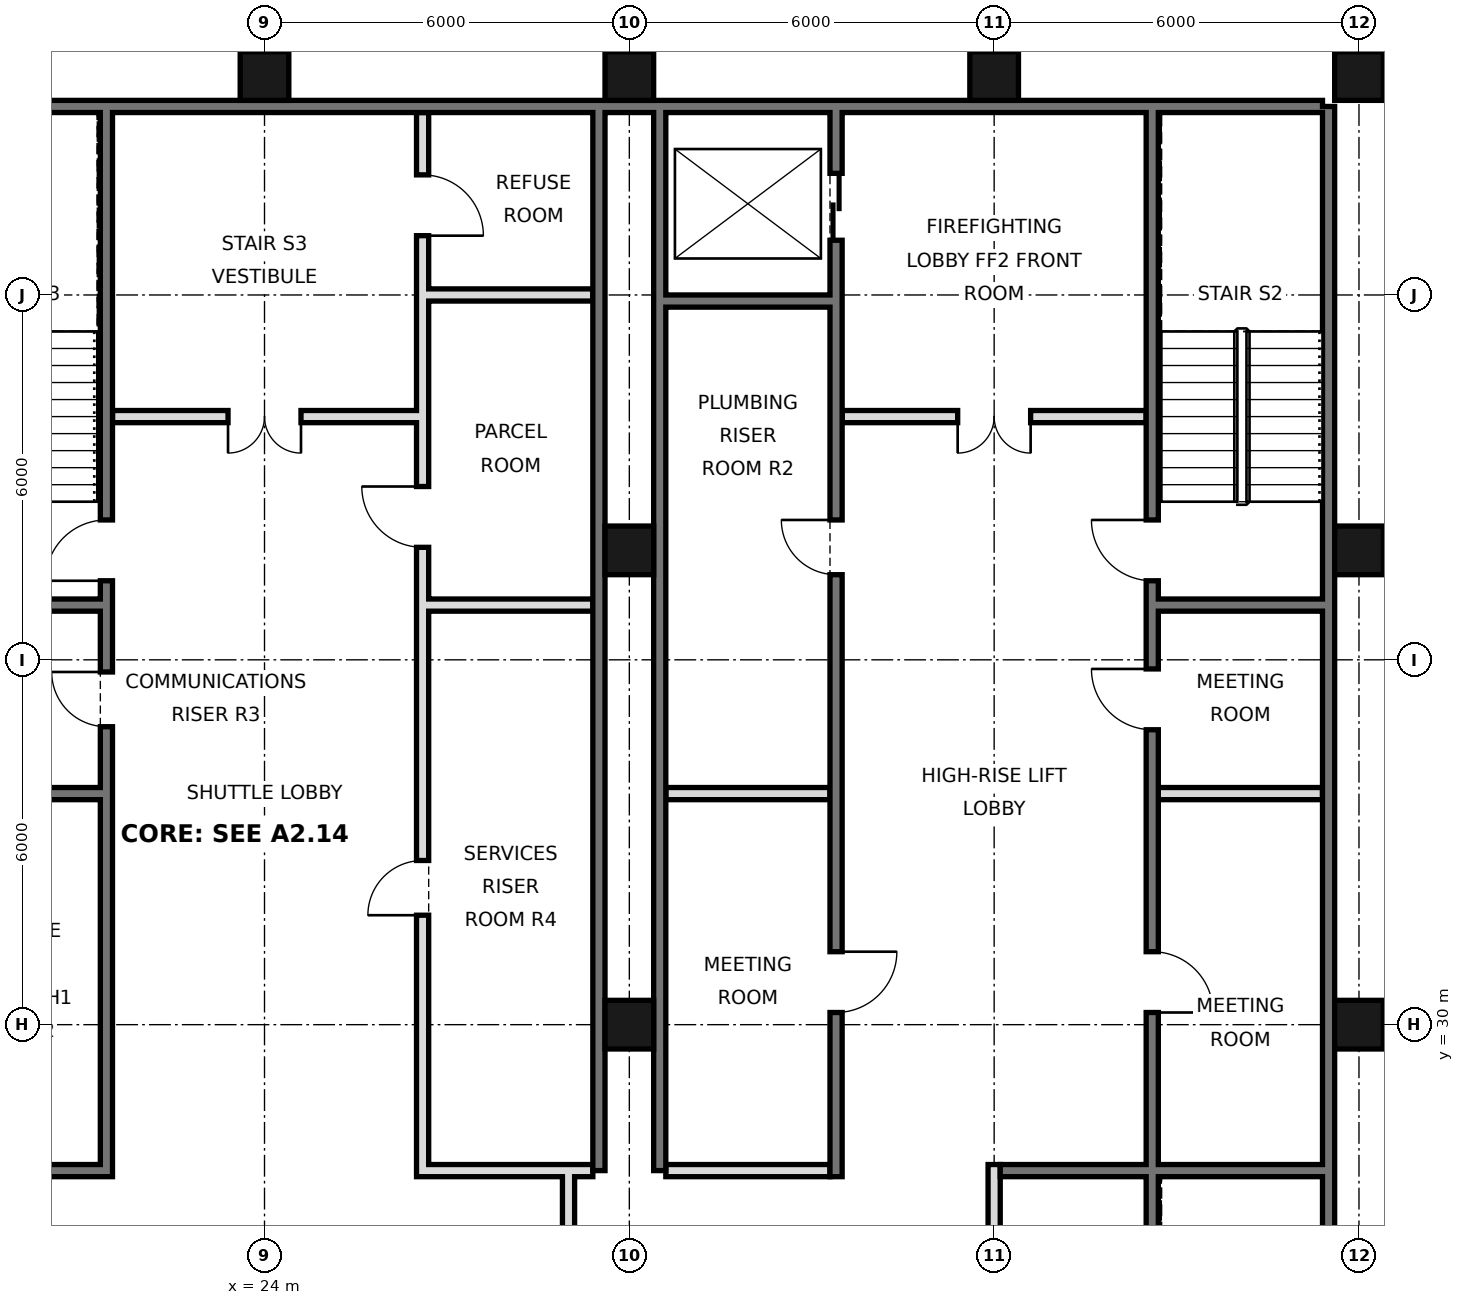
"""IFC4 building model, lengths in metres.
Left out: names, types, materials, properties, quantities, classifications, styles, units other than length and angle.
Written with IfcOpenShell. Run it as: python <this file> out.ifc"""

import sys

from ifc_helpers import new_model, si_unit, direction, frame, frame_2d, origin, origin_2d, place, context, subcontext, project, spatial, rectangle, hollow_rectangle, extrude, element, fill, save


model = new_model("IFC4")
c1 = context("Model", 3, precision=1e-05, world=origin(), true_north=direction((0.0, 1.0)))
c2 = subcontext(c1, "Body", "Model", "MODEL_VIEW")
j1 = project(units=[si_unit("LENGTHUNIT", "METRE"), si_unit("PLANEANGLEUNIT", "RADIAN")], contexts=[c1])
p1 = place(None, origin())
s1 = spatial("IfcSite", under=j1, at=p1, CompositionType="ELEMENT")
p2 = place(p1, origin())
s2 = spatial("IfcBuilding", under=s1, at=p2, CompositionType="ELEMENT")
p3 = place(p2, frame((0.0, 0.0, 57.0)))
s3 = spatial("IfcBuildingStorey", under=s2, at=p3, CompositionType="ELEMENT", Elevation=57.0)
for number, where, z_axis, x_axis in (
    (1, (24.0, 45.6, 0.0), (0.0, 0.0, 1.0), (1.0, 0.0, 0.0)),
    (2, (30.0, 30.0, 0.0), (0.0, 0.0, 1.0), (1.0, 0.0, 0.0)),
    (3, (30.0, 37.8, 0.0), (0.0, 0.0, 1.0), (1.0, 0.0, 0.0)),
    (4, (30.0, 45.6, 0.0), (0.0, 0.0, 1.0), (1.0, 0.0, 0.0)),
    (5, (36.0, 45.6, 0.0), (0.0, 0.0, 1.0), (1.0, 0.0, 0.0)),
    (6, (42.0, 30.0, 0.0), (0.0, 0.0, 1.0), (1.0, 0.0, 0.0)),
    (7, (42.0, 37.8, 0.0), (0.0, 0.0, 1.0), (1.0, 0.0, 0.0)),
    (8, (42.0, 45.6, 0.0), (0.0, 0.0, 1.0), (1.0, 0.0, 0.0)),
):
    element("IfcColumn", number, at=place(p3, frame(where, z_axis=z_axis, x_axis=x_axis)), inside=s3, PredefinedType="COLUMN", context=c2, shape_type="SweptSolid", body=[
        extrude(hollow_rectangle(XDim=0.8, YDim=0.8, WallThickness=0.06, at=origin_2d()), origin(), (0.0, 0.0, 1.0), 3.6),
    ])
p4 = place(p3, frame((41.5, 21.6, 0.0), z_axis=(0.0, 0.0, 1.0), x_axis=(0.0, 1.0, 0.0)))
e9 = element("IfcWall", 9, at=p4, inside=s3, PredefinedType="SOLIDWALL", context=c2, shape_type="SweptSolid", body=[
    extrude(rectangle(XDim=23.5, YDim=0.2, at=frame_2d((11.75, 0.0))), origin(), (0.0, 0.0, 1.0), 3.42),
])
p5 = place(p3, frame((6.6, 45.1, 0.0), z_axis=(0.0, 0.0, 1.0), x_axis=(1.0, 0.0, 0.0)))
e10 = element("IfcWall", 10, at=p5, inside=s3, PredefinedType="SOLIDWALL", context=c2, shape_type="SweptSolid", body=[
    extrude(rectangle(XDim=34.8, YDim=0.2, at=frame_2d((17.4, 0.0))), origin(), (0.0, 0.0, 1.0), 3.42),
])
for number, where, z_axis, x_axis in (
    (11, (29.5, 27.6, 0.0), (0.0, 0.0, 1.0), (0.0, 1.0, 0.0)),
    (12, (30.5, 27.6, 0.0), (0.0, 0.0, 1.0), (0.0, 1.0, 0.0)),
):
    element("IfcWall", number, at=place(p3, frame(where, z_axis=z_axis, x_axis=x_axis)), inside=s3, PredefinedType="SOLIDWALL", context=c2, shape_type="SweptSolid", body=[
        extrude(rectangle(XDim=17.5, YDim=0.2, at=frame_2d((8.75, 0.0))), origin(), (0.0, 0.0, 1.0), 3.42),
    ])
p6 = place(p3, frame((29.0, 21.6, 0.0), z_axis=(0.0, 0.0, 1.0), x_axis=(0.0, 1.0, 0.0)))
e13 = element("IfcWall", 13, at=p6, inside=s3, PredefinedType="PARTITIONING", context=c2, shape_type="SweptSolid", body=[
    extrude(rectangle(XDim=6.0, YDim=0.2, at=frame_2d((3.0, 0.0))), origin(), (0.0, 0.0, 1.0), 3.42),
])
p7 = place(p6, frame((2.1, 0.0, 0.0)))
e14 = element("IfcOpeningElement", 14, at=p7, cuts=e13, PredefinedType="OPENING", context=c2, shape_type="SweptSolid", body=[
    extrude(rectangle(XDim=1.8, YDim=2.1, at=frame_2d((0.9, 1.05))), frame((0.0, 0.11, 0.0), z_axis=(0.0, -1.0, 0.0), x_axis=(1.0, 0.0, 0.0)), (0.0, 0.0, 1.0), 0.22),
])
p8 = place(p3, frame((21.4, 27.5, 0.0), z_axis=(0.0, 0.0, 1.0), x_axis=(0.0, 1.0, 0.0)))
e15 = element("IfcWall", 15, at=p8, inside=s3, PredefinedType="SOLIDWALL", context=c2, shape_type="SweptSolid", body=[
    extrude(rectangle(XDim=17.5, YDim=0.2, at=frame_2d((8.75, 0.0))), origin(), (0.0, 0.0, 1.0), 3.42),
])
p9 = place(p8, frame((9.8, 0.0, 0.0)))
e16 = element("IfcOpeningElement", 16, at=p9, cuts=e15, PredefinedType="OPENING", context=c2, shape_type="SweptSolid", body=[
    extrude(rectangle(XDim=1.0, YDim=2.1, at=frame_2d((0.5, 1.05))), frame((0.0, 0.11, 0.0), z_axis=(0.0, -1.0, 0.0), x_axis=(1.0, 0.0, 0.0)), (0.0, 0.0, 1.0), 0.22),
])
p10 = place(p8, frame((7.4, 0.0, 0.0)))
e17 = element("IfcOpeningElement", 17, at=p10, cuts=e15, PredefinedType="OPENING", context=c2, shape_type="SweptSolid", body=[
    extrude(rectangle(XDim=0.9, YDim=2.1, at=frame_2d((0.45, 1.05))), frame((0.0, 0.11, 0.0), z_axis=(0.0, -1.0, 0.0), x_axis=(1.0, 0.0, 0.0)), (0.0, 0.0, 1.0), 0.22),
])
p11 = place(p3, frame((26.6, 27.5, 0.0), z_axis=(0.0, 0.0, 1.0), x_axis=(0.0, 1.0, 0.0)))
e18 = element("IfcWall", 18, at=p11, inside=s3, PredefinedType="SOLIDWALL", context=c2, shape_type="SweptSolid", body=[
    extrude(rectangle(XDim=17.5, YDim=0.2, at=frame_2d((8.75, 0.0))), origin(), (0.0, 0.0, 1.0), 3.42),
])
p12 = place(p11, frame((4.3, 0.0, 0.0)))
e19 = element("IfcOpeningElement", 19, at=p12, cuts=e18, PredefinedType="OPENING", context=c2, shape_type="SweptSolid", body=[
    extrude(rectangle(XDim=0.9, YDim=2.1, at=frame_2d((0.45, 1.05))), frame((0.0, 0.11, 0.0), z_axis=(0.0, -1.0, 0.0), x_axis=(1.0, 0.0, 0.0)), (0.0, 0.0, 1.0), 0.22),
])
p13 = place(p11, frame((10.35, 0.0, 0.0)))
e20 = element("IfcOpeningElement", 20, at=p13, cuts=e18, PredefinedType="OPENING", context=c2, shape_type="SweptSolid", body=[
    extrude(rectangle(XDim=1.0, YDim=2.1, at=frame_2d((0.5, 1.05))), frame((0.0, 0.11, 0.0), z_axis=(0.0, -1.0, 0.0), x_axis=(1.0, 0.0, 0.0)), (0.0, 0.0, 1.0), 0.22),
])
p14 = place(p11, frame((15.475, 0.0, 0.0)))
e21 = element("IfcOpeningElement", 21, at=p14, cuts=e18, PredefinedType="OPENING", context=c2, shape_type="SweptSolid", body=[
    extrude(rectangle(XDim=1.0, YDim=2.1, at=frame_2d((0.5, 1.05))), frame((0.0, 0.11, 0.0), z_axis=(0.0, -1.0, 0.0), x_axis=(1.0, 0.0, 0.0)), (0.0, 0.0, 1.0), 0.22),
])
p15 = place(p3, frame((33.4, 27.5, 0.0), z_axis=(0.0, 0.0, 1.0), x_axis=(0.0, 1.0, 0.0)))
e22 = element("IfcWall", 22, at=p15, inside=s3, PredefinedType="SOLIDWALL", context=c2, shape_type="SweptSolid", body=[
    extrude(rectangle(XDim=17.5, YDim=0.2, at=frame_2d((8.75, 0.0))), origin(), (0.0, 0.0, 1.0), 3.42),
])
p16 = place(p15, frame((15.4, 0.0, 0.0)))
e23 = element("IfcOpeningElement", 23, at=p16, cuts=e22, PredefinedType="OPENING", context=c2, shape_type="SweptSolid", body=[
    extrude(rectangle(XDim=1.1, YDim=2.1, at=frame_2d((0.55, 1.05))), frame((0.0, 0.11, 0.0), z_axis=(0.0, -1.0, 0.0), x_axis=(1.0, 0.0, 0.0)), (0.0, 0.0, 1.0), 0.22),
])
p17 = place(p15, frame((2.7, 0.0, 0.0)))
e24 = element("IfcOpeningElement", 24, at=p17, cuts=e22, PredefinedType="OPENING", context=c2, shape_type="SweptSolid", body=[
    extrude(rectangle(XDim=1.0, YDim=2.1, at=frame_2d((0.5, 1.05))), frame((0.0, 0.11, 0.0), z_axis=(0.0, -1.0, 0.0), x_axis=(1.0, 0.0, 0.0)), (0.0, 0.0, 1.0), 0.22),
])
p18 = place(p15, frame((9.9, 0.0, 0.0)))
e25 = element("IfcOpeningElement", 25, at=p18, cuts=e22, PredefinedType="OPENING", context=c2, shape_type="SweptSolid", body=[
    extrude(rectangle(XDim=0.9, YDim=2.1, at=frame_2d((0.45, 1.05))), frame((0.0, 0.11, 0.0), z_axis=(0.0, -1.0, 0.0), x_axis=(1.0, 0.0, 0.0)), (0.0, 0.0, 1.0), 0.22),
])
p19 = place(p3, frame((36.0, 21.6, 0.0), z_axis=(0.0, 0.0, 1.0), x_axis=(0.0, 1.0, 0.0)))
e26 = element("IfcWall", 26, at=p19, inside=s3, PredefinedType="PARTITIONING", context=c2, shape_type="SweptSolid", body=[
    extrude(rectangle(XDim=6.1, YDim=0.2, at=frame_2d((3.05, 0.0))), origin(), (0.0, 0.0, 1.0), 3.42),
])
p20 = place(p3, frame((38.6, 21.6, 0.0), z_axis=(0.0, 0.0, 1.0), x_axis=(0.0, 1.0, 0.0)))
e27 = element("IfcWall", 27, at=p20, inside=s3, PredefinedType="SOLIDWALL", context=c2, shape_type="SweptSolid", body=[
    extrude(rectangle(XDim=23.4, YDim=0.2, at=frame_2d((11.7, 0.0))), origin(), (0.0, 0.0, 1.0), 3.42),
])
p21 = place(p20, frame((8.6, 0.0, 0.0)))
e28 = element("IfcOpeningElement", 28, at=p21, cuts=e27, PredefinedType="OPENING", context=c2, shape_type="SweptSolid", body=[
    extrude(rectangle(XDim=1.0, YDim=2.1, at=frame_2d((0.5, 1.05))), frame((0.0, 0.11, 0.0), z_axis=(0.0, -1.0, 0.0), x_axis=(1.0, 0.0, 0.0)), (0.0, 0.0, 1.0), 0.22),
])
p22 = place(p20, frame((13.25, 0.0, 0.0)))
e29 = element("IfcOpeningElement", 29, at=p22, cuts=e27, PredefinedType="OPENING", context=c2, shape_type="SweptSolid", body=[
    extrude(rectangle(XDim=1.0, YDim=2.1, at=frame_2d((0.5, 1.05))), frame((0.0, 0.11, 0.0), z_axis=(0.0, -1.0, 0.0), x_axis=(1.0, 0.0, 0.0)), (0.0, 0.0, 1.0), 0.22),
])
p23 = place(p20, frame((15.7, 0.0, 0.0)))
e30 = element("IfcOpeningElement", 30, at=p23, cuts=e27, PredefinedType="OPENING", context=c2, shape_type="SweptSolid", body=[
    extrude(rectangle(XDim=1.0, YDim=2.1, at=frame_2d((0.5, 1.05))), frame((0.0, 0.11, 0.0), z_axis=(0.0, -1.0, 0.0), x_axis=(1.0, 0.0, 0.0)), (0.0, 0.0, 1.0), 0.22),
])
p24 = place(p20, frame((0.175, 0.0, 0.0)))
e31 = element("IfcOpeningElement", 31, at=p24, cuts=e27, PredefinedType="OPENING", context=c2, shape_type="SweptSolid", body=[
    extrude(rectangle(XDim=0.9, YDim=2.1, at=frame_2d((0.45, 1.05))), frame((0.0, 0.11, 0.0), z_axis=(0.0, -1.0, 0.0), x_axis=(1.0, 0.0, 0.0)), (0.0, 0.0, 1.0), 0.22),
])
for number, where, z_axis, x_axis in (
    (32, (18.6, 27.6, 0.0), (0.0, 0.0, 1.0), (1.0, 0.0, 0.0)),
    (33, (26.7, 27.6, 0.0), (0.0, 0.0, 1.0), (1.0, 0.0, 0.0)),
):
    element("IfcWall", number, at=place(p3, frame(where, z_axis=z_axis, x_axis=x_axis)), inside=s3, PredefinedType="SOLIDWALL", context=c2, shape_type="SweptSolid", body=[
        extrude(rectangle(XDim=2.7, YDim=0.2, at=frame_2d((1.35, 0.0))), origin(), (0.0, 0.0, 1.0), 3.42),
    ])
p25 = place(p3, frame((30.6, 27.6, 0.0), z_axis=(0.0, 0.0, 1.0), x_axis=(1.0, 0.0, 0.0)))
e34 = element("IfcWall", 34, at=p25, inside=s3, PredefinedType="PARTITIONING", context=c2, shape_type="SweptSolid", body=[
    extrude(rectangle(XDim=2.7, YDim=0.2, at=frame_2d((1.35, 0.0))), origin(), (0.0, 0.0, 1.0), 3.42),
])
p26 = place(p3, frame((36.1, 27.6, 0.0), z_axis=(0.0, 0.0, 1.0), x_axis=(1.0, 0.0, 0.0)))
e35 = element("IfcWall", 35, at=p26, inside=s3, PredefinedType="SOLIDWALL", context=c2, shape_type="SweptSolid", body=[
    extrude(rectangle(XDim=5.3, YDim=0.2, at=frame_2d((2.65, 0.0))), origin(), (0.0, 0.0, 1.0), 3.42),
])
for number, where, z_axis, x_axis in (
    (36, (18.6, 33.8, 0.0), (0.0, 0.0, 1.0), (1.0, 0.0, 0.0)),
    (37, (30.6, 33.8, 0.0), (0.0, 0.0, 1.0), (1.0, 0.0, 0.0)),
):
    element("IfcWall", number, at=place(p3, frame(where, z_axis=z_axis, x_axis=x_axis)), inside=s3, PredefinedType="SOLIDWALL", context=c2, shape_type="SweptSolid", body=[
        extrude(rectangle(XDim=2.7, YDim=0.2, at=frame_2d((1.35, 0.0))), origin(), (0.0, 0.0, 1.0), 3.42),
    ])
p27 = place(p3, frame((38.7, 33.8, 0.0), z_axis=(0.0, 0.0, 1.0), x_axis=(1.0, 0.0, 0.0)))
e38 = element("IfcWall", 38, at=p27, inside=s3, PredefinedType="PARTITIONING", context=c2, shape_type="SweptSolid", body=[
    extrude(rectangle(XDim=2.7, YDim=0.2, at=frame_2d((1.35, 0.0))), origin(), (0.0, 0.0, 1.0), 3.42),
])
for number, where, z_axis, x_axis in (
    (39, (18.6, 36.9, 0.0), (0.0, 0.0, 1.0), (1.0, 0.0, 0.0)),
    (40, (26.7, 36.9, 0.0), (0.0, 0.0, 1.0), (1.0, 0.0, 0.0)),
    (41, (38.7, 36.9, 0.0), (0.0, 0.0, 1.0), (1.0, 0.0, 0.0)),
):
    element("IfcWall", number, at=place(p3, frame(where, z_axis=z_axis, x_axis=x_axis)), inside=s3, PredefinedType="SOLIDWALL", context=c2, shape_type="SweptSolid", body=[
        extrude(rectangle(XDim=2.7, YDim=0.2, at=frame_2d((1.35, 0.0))), origin(), (0.0, 0.0, 1.0), 3.42),
    ])
p28 = place(p3, frame((21.5, 40.0, 0.0), z_axis=(0.0, 0.0, 1.0), x_axis=(1.0, 0.0, 0.0)))
e42 = element("IfcWall", 42, at=p28, inside=s3, PredefinedType="PARTITIONING", context=c2, shape_type="SweptSolid", body=[
    extrude(rectangle(XDim=5.0, YDim=0.2, at=frame_2d((2.5, 0.0))), origin(), (0.0, 0.0, 1.0), 3.42),
])
p29 = place(p28, frame((1.9, 0.0, 0.0)))
e43 = element("IfcOpeningElement", 43, at=p29, cuts=e42, PredefinedType="OPENING", context=c2, shape_type="SweptSolid", body=[
    extrude(rectangle(XDim=1.2, YDim=2.1, at=frame_2d((0.6, 1.05))), frame((0.0, 0.11, 0.0), z_axis=(0.0, -1.0, 0.0), x_axis=(1.0, 0.0, 0.0)), (0.0, 0.0, 1.0), 0.22),
])
p30 = place(p3, frame((33.5, 40.0, 0.0), z_axis=(0.0, 0.0, 1.0), x_axis=(1.0, 0.0, 0.0)))
e44 = element("IfcWall", 44, at=p30, inside=s3, PredefinedType="PARTITIONING", context=c2, shape_type="SweptSolid", body=[
    extrude(rectangle(XDim=5.0, YDim=0.2, at=frame_2d((2.5, 0.0))), origin(), (0.0, 0.0, 1.0), 3.42),
])
p31 = place(p30, frame((1.9, 0.0, 0.0)))
e45 = element("IfcOpeningElement", 45, at=p31, cuts=e44, PredefinedType="OPENING", context=c2, shape_type="SweptSolid", body=[
    extrude(rectangle(XDim=1.2, YDim=2.1, at=frame_2d((0.6, 1.05))), frame((0.0, 0.11, 0.0), z_axis=(0.0, -1.0, 0.0), x_axis=(1.0, 0.0, 0.0)), (0.0, 0.0, 1.0), 0.22),
])
p32 = place(p3, frame((30.6, 41.9, 0.0), z_axis=(0.0, 0.0, 1.0), x_axis=(1.0, 0.0, 0.0)))
e46 = element("IfcWall", 46, at=p32, inside=s3, PredefinedType="SOLIDWALL", context=c2, shape_type="SweptSolid", body=[
    extrude(rectangle(XDim=2.7, YDim=0.2, at=frame_2d((1.35, 0.0))), origin(), (0.0, 0.0, 1.0), 3.42),
])
p33 = place(p3, frame((26.7, 42.0, 0.0), z_axis=(0.0, 0.0, 1.0), x_axis=(1.0, 0.0, 0.0)))
e47 = element("IfcWall", 47, at=p33, inside=s3, PredefinedType="PARTITIONING", context=c2, shape_type="SweptSolid", body=[
    extrude(rectangle(XDim=2.7, YDim=0.2, at=frame_2d((1.35, 0.0))), origin(), (0.0, 0.0, 1.0), 3.42),
])
p34 = place(p29, frame((1.2, 0.0, 0.0), z_axis=(0.0, 0.0, 1.0), x_axis=(-1.0, 0.0, 0.0)))
e48 = element("IfcDoor", 48, at=p34, inside=s3, OperationType="DOUBLE_DOOR_SINGLE_SWING", PredefinedType="DOOR", context=c2, shape_type="SweptSolid", body=[
    extrude(rectangle(XDim=1.2, YDim=2.1, at=frame_2d((0.6, 1.05))), frame((0.0, 0.025, 0.0), z_axis=(0.0, -1.0, 0.0), x_axis=(1.0, 0.0, 0.0)), (0.0, 0.0, 1.0), 0.05),
])
fill(e43, e48)
p35 = place(p31, frame((1.2, 0.0, 0.0), z_axis=(0.0, 0.0, 1.0), x_axis=(-1.0, 0.0, 0.0)))
e49 = element("IfcDoor", 49, at=p35, inside=s3, OperationType="DOUBLE_DOOR_SINGLE_SWING", PredefinedType="DOOR", context=c2, shape_type="SweptSolid", body=[
    extrude(rectangle(XDim=1.2, YDim=2.1, at=frame_2d((0.6, 1.05))), frame((0.0, 0.025, 0.0), z_axis=(0.0, -1.0, 0.0), x_axis=(1.0, 0.0, 0.0)), (0.0, 0.0, 1.0), 0.05),
])
fill(e45, e49)
p36 = place(p16, origin())
e50 = element("IfcDoor", 50, at=p36, inside=s3, OperationType="DOUBLE_DOOR_SLIDING", PredefinedType="DOOR", context=c2, shape_type="SweptSolid", body=[
    extrude(rectangle(XDim=1.1, YDim=2.1, at=frame_2d((0.55, 1.05))), frame((0.0, 0.025, 0.0), z_axis=(0.0, -1.0, 0.0), x_axis=(1.0, 0.0, 0.0)), (0.0, 0.0, 1.0), 0.05),
])
fill(e23, e50)
p37 = place(p21, frame((1.0, 0.0, 0.0), z_axis=(0.0, 0.0, 1.0), x_axis=(-1.0, 0.0, 0.0)))
e51 = element("IfcDoor", 51, at=p37, inside=s3, OperationType="SINGLE_SWING_RIGHT", PredefinedType="DOOR", context=c2, shape_type="SweptSolid", body=[
    extrude(rectangle(XDim=1.0, YDim=2.1, at=frame_2d((0.5, 1.05))), frame((0.0, 0.025, 0.0), z_axis=(0.0, -1.0, 0.0), x_axis=(1.0, 0.0, 0.0)), (0.0, 0.0, 1.0), 0.05),
])
fill(e28, e51)
p38 = place(p22, frame((1.0, 0.0, 0.0), z_axis=(0.0, 0.0, 1.0), x_axis=(-1.0, 0.0, 0.0)))
e52 = element("IfcDoor", 52, at=p38, inside=s3, OperationType="SINGLE_SWING_LEFT", PredefinedType="DOOR", context=c2, shape_type="SweptSolid", body=[
    extrude(rectangle(XDim=1.0, YDim=2.1, at=frame_2d((0.5, 1.05))), frame((0.0, 0.025, 0.0), z_axis=(0.0, -1.0, 0.0), x_axis=(1.0, 0.0, 0.0)), (0.0, 0.0, 1.0), 0.05),
])
fill(e29, e52)
p39 = place(p17, origin())
e53 = element("IfcDoor", 53, at=p39, inside=s3, OperationType="SINGLE_SWING_RIGHT", PredefinedType="DOOR", context=c2, shape_type="SweptSolid", body=[
    extrude(rectangle(XDim=1.0, YDim=2.1, at=frame_2d((0.5, 1.05))), frame((0.0, 0.025, 0.0), z_axis=(0.0, -1.0, 0.0), x_axis=(1.0, 0.0, 0.0)), (0.0, 0.0, 1.0), 0.05),
])
fill(e24, e53)
p40 = place(p23, frame((1.0, 0.0, 0.0), z_axis=(0.0, 0.0, 1.0), x_axis=(-1.0, 0.0, 0.0)))
e54 = element("IfcDoor", 54, at=p40, inside=s3, OperationType="SINGLE_SWING_LEFT", PredefinedType="DOOR", context=c2, shape_type="SweptSolid", body=[
    extrude(rectangle(XDim=1.0, YDim=2.1, at=frame_2d((0.5, 1.05))), frame((0.0, 0.025, 0.0), z_axis=(0.0, -1.0, 0.0), x_axis=(1.0, 0.0, 0.0)), (0.0, 0.0, 1.0), 0.05),
])
fill(e30, e54)
p41 = place(p9, origin())
e55 = element("IfcDoor", 55, at=p41, inside=s3, OperationType="SINGLE_SWING_LEFT", PredefinedType="DOOR", context=c2, shape_type="SweptSolid", body=[
    extrude(rectangle(XDim=1.0, YDim=2.1, at=frame_2d((0.5, 1.05))), frame((0.0, 0.025, 0.0), z_axis=(0.0, -1.0, 0.0), x_axis=(1.0, 0.0, 0.0)), (0.0, 0.0, 1.0), 0.05),
])
fill(e16, e55)
p42 = place(p18, frame((0.9, 0.0, 0.0), z_axis=(0.0, 0.0, 1.0), x_axis=(-1.0, 0.0, 0.0)))
e56 = element("IfcDoor", 56, at=p42, inside=s3, OperationType="SINGLE_SWING_LEFT", PredefinedType="DOOR", context=c2, shape_type="SweptSolid", body=[
    extrude(rectangle(XDim=0.9, YDim=2.1, at=frame_2d((0.45, 1.05))), frame((0.0, 0.025, 0.0), z_axis=(0.0, -1.0, 0.0), x_axis=(1.0, 0.0, 0.0)), (0.0, 0.0, 1.0), 0.05),
])
fill(e25, e56)
p43 = place(p10, frame((0.9, 0.0, 0.0), z_axis=(0.0, 0.0, 1.0), x_axis=(-1.0, 0.0, 0.0)))
e57 = element("IfcDoor", 57, at=p43, inside=s3, OperationType="SINGLE_SWING_LEFT", PredefinedType="DOOR", context=c2, shape_type="SweptSolid", body=[
    extrude(rectangle(XDim=0.9, YDim=2.1, at=frame_2d((0.45, 1.05))), frame((0.0, 0.025, 0.0), z_axis=(0.0, -1.0, 0.0), x_axis=(1.0, 0.0, 0.0)), (0.0, 0.0, 1.0), 0.05),
])
fill(e17, e57)
p44 = place(p12, origin())
e58 = element("IfcDoor", 58, at=p44, inside=s3, OperationType="SINGLE_SWING_LEFT", PredefinedType="DOOR", context=c2, shape_type="SweptSolid", body=[
    extrude(rectangle(XDim=0.9, YDim=2.1, at=frame_2d((0.45, 1.05))), frame((0.0, 0.025, 0.0), z_axis=(0.0, -1.0, 0.0), x_axis=(1.0, 0.0, 0.0)), (0.0, 0.0, 1.0), 0.05),
])
fill(e19, e58)
p45 = place(p13, frame((1.0, 0.0, 0.0), z_axis=(0.0, 0.0, 1.0), x_axis=(-1.0, 0.0, 0.0)))
e59 = element("IfcDoor", 59, at=p45, inside=s3, OperationType="SINGLE_SWING_LEFT", PredefinedType="DOOR", context=c2, shape_type="SweptSolid", body=[
    extrude(rectangle(XDim=1.0, YDim=2.1, at=frame_2d((0.5, 1.05))), frame((0.0, 0.025, 0.0), z_axis=(0.0, -1.0, 0.0), x_axis=(1.0, 0.0, 0.0)), (0.0, 0.0, 1.0), 0.05),
])
fill(e20, e59)
p46 = place(p14, frame((1.0, 0.0, 0.0), z_axis=(0.0, 0.0, 1.0), x_axis=(-1.0, 0.0, 0.0)))
e60 = element("IfcDoor", 60, at=p46, inside=s3, OperationType="SINGLE_SWING_RIGHT", PredefinedType="DOOR", context=c2, shape_type="SweptSolid", body=[
    extrude(rectangle(XDim=1.0, YDim=2.1, at=frame_2d((0.5, 1.05))), frame((0.0, 0.025, 0.0), z_axis=(0.0, -1.0, 0.0), x_axis=(1.0, 0.0, 0.0)), (0.0, 0.0, 1.0), 0.05),
])
fill(e21, e60)
save(model, sys.argv[1])
